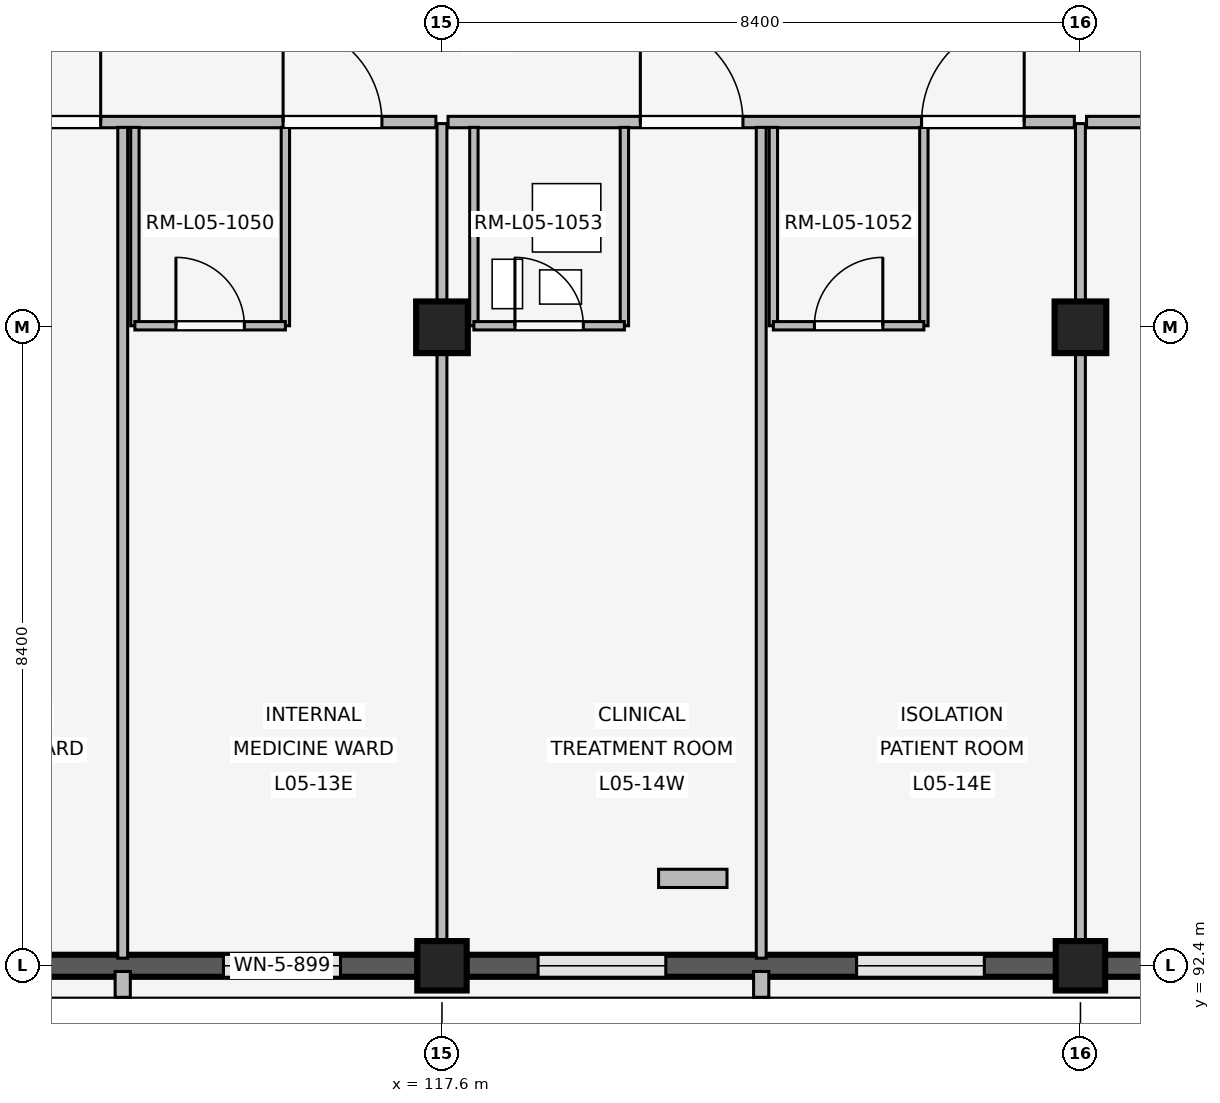
"""IFC4 building model, lengths in metres.
Left out: names, types, materials, properties, quantities, classifications, styles, units other than length and angle.
Written with IfcOpenShell. Run it as: python <this file> out.ifc"""

import sys

from ifc_helpers import new_model, si_unit, direction, frame, frame_2d, origin, origin_2d, place, context, subcontext, project, spatial, rectangle, extrude, element, fill, save


model = new_model("IFC4")
c1 = context("Model", 3, precision=1e-05, world=origin(), true_north=direction((0.0, 1.0)))
c2 = subcontext(c1, "Body", "Model", "MODEL_VIEW")
j1 = project(units=[si_unit("LENGTHUNIT", "METRE"), si_unit("PLANEANGLEUNIT", "RADIAN")], contexts=[c1])
p1 = place(None, origin())
s1 = spatial("IfcSite", under=j1, at=p1, CompositionType="ELEMENT")
p2 = place(p1, origin())
s2 = spatial("IfcBuilding", under=s1, at=p2, CompositionType="ELEMENT")
p3 = place(p2, frame((0.0, 0.0, 20.4)))
s3 = spatial("IfcBuildingStorey", under=s2, at=p3, CompositionType="ELEMENT", Elevation=20.4)
p4 = place(p3, frame((117.6, 92.4, 0.0), z_axis=(0.0, 0.0, 1.0), x_axis=(1.0, 0.0, 0.0)))
e1 = element("IfcColumn", 1, at=p4, inside=s3, PredefinedType="COLUMN", context=c2, shape_type="SweptSolid", body=[
    extrude(rectangle(XDim=0.65, YDim=0.65, at=origin_2d()), origin(), (0.0, 0.0, 1.0), 4.2),
])
p5 = place(p3, frame((117.6, 100.8, 0.0), z_axis=(0.0, 0.0, 1.0), x_axis=(1.0, 0.0, 0.0)))
e2 = element("IfcColumn", 2, at=p5, inside=s3, PredefinedType="COLUMN", context=c2, shape_type="SweptSolid", body=[
    extrude(rectangle(XDim=0.68, YDim=0.68, at=origin_2d()), origin(), (0.0, 0.0, 1.0), 4.2),
])
p6 = place(p3, frame((126.0, 92.4, 0.0), z_axis=(0.0, 0.0, 1.0), x_axis=(1.0, 0.0, 0.0)))
e3 = element("IfcColumn", 3, at=p6, inside=s3, PredefinedType="COLUMN", context=c2, shape_type="SweptSolid", body=[
    extrude(rectangle(XDim=0.65, YDim=0.65, at=origin_2d()), origin(), (0.0, 0.0, 1.0), 4.2),
])
p7 = place(p3, frame((126.0, 100.8, 0.0), z_axis=(0.0, 0.0, 1.0), x_axis=(1.0, 0.0, 0.0)))
e4 = element("IfcColumn", 4, at=p7, inside=s3, PredefinedType="COLUMN", context=c2, shape_type="SweptSolid", body=[
    extrude(rectangle(XDim=0.68, YDim=0.68, at=origin_2d()), origin(), (0.0, 0.0, 1.0), 4.2),
])
p8 = place(p3, frame((117.28, 92.4, 0.0), z_axis=(0.0, 0.0, 1.0), x_axis=(-1.0, 0.0, 0.0)))
e5 = element("IfcWall", 5, at=p8, inside=s3, PredefinedType="SOLIDWALL", context=c2, shape_type="SweptSolid", body=[
    extrude(rectangle(XDim=7.76, YDim=0.29, at=frame_2d((3.88, 0.0))), origin(), (0.0, 0.0, 1.0), 3.34),
])
p9 = place(p8, frame((1.015, 0.0, 0.85)))
e6 = element("IfcOpeningElement", 6, at=p9, cuts=e5, PredefinedType="OPENING", context=c2, shape_type="SweptSolid", body=[
    extrude(rectangle(XDim=1.54, YDim=1.85, at=frame_2d((0.77, 0.925))), frame((0.0, 0.155, 0.0), z_axis=(0.0, -1.0, 0.0), x_axis=(1.0, 0.0, 0.0)), (0.0, 0.0, 1.0), 0.31),
])
p10 = place(p8, frame((5.205, 0.0, 0.85)))
e7 = element("IfcOpeningElement", 7, at=p10, cuts=e5, PredefinedType="OPENING", context=c2, shape_type="SweptSolid", body=[
    extrude(rectangle(XDim=1.54, YDim=1.85, at=frame_2d((0.77, 0.925))), frame((0.0, 0.155, 0.0), z_axis=(0.0, -1.0, 0.0), x_axis=(1.0, 0.0, 0.0)), (0.0, 0.0, 1.0), 0.31),
])
p11 = place(p3, frame((113.4, 92.325, 0.0), z_axis=(0.0, 0.0, 1.0), x_axis=(0.0, -1.0, 0.0)))
e8 = element("IfcWall", 8, at=p11, inside=s3, PredefinedType="ELEMENTEDWALL", context=c2, shape_type="SweptSolid", body=[
    extrude(rectangle(XDim=0.34, YDim=0.2, at=frame_2d((0.17, 0.0))), origin(), (0.0, 0.0, 1.0), 3.32),
])
p12 = place(p3, frame((125.68, 92.4, 0.0), z_axis=(0.0, 0.0, 1.0), x_axis=(-1.0, 0.0, 0.0)))
e9 = element("IfcWall", 9, at=p12, inside=s3, PredefinedType="SOLIDWALL", context=c2, shape_type="SweptSolid", body=[
    extrude(rectangle(XDim=7.76, YDim=0.29, at=frame_2d((3.88, 0.0))), origin(), (0.0, 0.0, 1.0), 3.34),
])
p13 = place(p12, frame((0.945, 0.0, 0.85)))
e10 = element("IfcOpeningElement", 10, at=p13, cuts=e9, PredefinedType="OPENING", context=c2, shape_type="SweptSolid", body=[
    extrude(rectangle(XDim=1.68, YDim=2.05, at=frame_2d((0.84, 1.025))), frame((0.0, 0.155, 0.0), z_axis=(0.0, -1.0, 0.0), x_axis=(1.0, 0.0, 0.0)), (0.0, 0.0, 1.0), 0.31),
])
p14 = place(p12, frame((5.135, 0.0, 0.85)))
e11 = element("IfcOpeningElement", 11, at=p14, cuts=e9, PredefinedType="OPENING", context=c2, shape_type="SweptSolid", body=[
    extrude(rectangle(XDim=1.68, YDim=2.05, at=frame_2d((0.84, 1.025))), frame((0.0, 0.155, 0.0), z_axis=(0.0, -1.0, 0.0), x_axis=(1.0, 0.0, 0.0)), (0.0, 0.0, 1.0), 0.31),
])
p15 = place(p3, frame((121.8, 92.325, 0.0), z_axis=(0.0, 0.0, 1.0), x_axis=(0.0, -1.0, 0.0)))
e12 = element("IfcWall", 12, at=p15, inside=s3, PredefinedType="ELEMENTEDWALL", context=c2, shape_type="SweptSolid", body=[
    extrude(rectangle(XDim=0.34, YDim=0.2, at=frame_2d((0.17, 0.0))), origin(), (0.0, 0.0, 1.0), 3.32),
])
p16 = place(p3, frame((134.08, 92.4, 0.0), z_axis=(0.0, 0.0, 1.0), x_axis=(-1.0, 0.0, 0.0)))
e13 = element("IfcWall", 13, at=p16, inside=s3, PredefinedType="SOLIDWALL", context=c2, shape_type="SweptSolid", body=[
    extrude(rectangle(XDim=7.76, YDim=0.29, at=frame_2d((3.88, 0.0))), origin(), (0.0, 0.0, 1.0), 3.34),
])
p17 = place(p16, frame((1.095, 0.0, 0.85)))
e14 = element("IfcOpeningElement", 14, at=p17, cuts=e13, PredefinedType="OPENING", context=c2, shape_type="SweptSolid", body=[
    extrude(rectangle(XDim=1.38, YDim=1.5, at=frame_2d((0.69, 0.75))), frame((0.0, 0.155, 0.0), z_axis=(0.0, -1.0, 0.0), x_axis=(1.0, 0.0, 0.0)), (0.0, 0.0, 1.0), 0.31),
])
p18 = place(p16, frame((5.285, 0.0, 0.85)))
e15 = element("IfcOpeningElement", 15, at=p18, cuts=e13, PredefinedType="OPENING", context=c2, shape_type="SweptSolid", body=[
    extrude(rectangle(XDim=1.38, YDim=1.5, at=frame_2d((0.69, 0.75))), frame((0.0, 0.155, 0.0), z_axis=(0.0, -1.0, 0.0), x_axis=(1.0, 0.0, 0.0)), (0.0, 0.0, 1.0), 0.31),
])
p19 = place(p3, frame((109.28, 103.5, 0.0), z_axis=(0.0, 0.0, 1.0), x_axis=(1.0, 0.0, 0.0)))
e16 = element("IfcWall", 16, at=p19, inside=s3, PredefinedType="PARTITIONING", context=c2, shape_type="SweptSolid", body=[
    extrude(rectangle(XDim=8.24, YDim=0.15, at=frame_2d((4.12, 0.0))), origin(), (0.0, 0.0, 1.0), 3.32),
])
p20 = place(p19, frame((2.53, 0.0, 0.0)))
e17 = element("IfcOpeningElement", 17, at=p20, cuts=e16, PredefinedType="OPENING", context=c2, shape_type="SweptSolid", body=[
    extrude(rectangle(XDim=1.3, YDim=2.25, at=frame_2d((0.65, 1.125))), frame((0.0, 0.085, 0.0), z_axis=(0.0, -1.0, 0.0), x_axis=(1.0, 0.0, 0.0)), (0.0, 0.0, 1.0), 0.17),
])
p21 = place(p19, frame((6.23, 0.0, 0.0)))
e18 = element("IfcOpeningElement", 18, at=p21, cuts=e16, PredefinedType="OPENING", context=c2, shape_type="SweptSolid", body=[
    extrude(rectangle(XDim=1.3, YDim=2.25, at=frame_2d((0.65, 1.125))), frame((0.0, 0.085, 0.0), z_axis=(0.0, -1.0, 0.0), x_axis=(1.0, 0.0, 0.0)), (0.0, 0.0, 1.0), 0.17),
])
p22 = place(p3, frame((113.4, 92.5, 0.0), z_axis=(0.0, 0.0, 1.0), x_axis=(0.0, 1.0, 0.0)))
e19 = element("IfcWall", 19, at=p22, inside=s3, PredefinedType="PARTITIONING", context=c2, shape_type="SweptSolid", body=[
    extrude(rectangle(XDim=10.93, YDim=0.13, at=frame_2d((5.465, 0.0))), origin(), (0.0, 0.0, 1.0), 3.32),
])
for number, where, z_axis, x_axis in (
    (20, (113.56, 100.82, 0.0), (0.0, 0.0, 1.0), (0.0, 1.0, 0.0)),
    (21, (115.54, 100.82, 0.0), (0.0, 0.0, 1.0), (0.0, 1.0, 0.0)),
):
    element("IfcWall", number, at=place(p3, frame(where, z_axis=z_axis, x_axis=x_axis)), inside=s3, PredefinedType="PARTITIONING", context=c2, shape_type="SweptSolid", body=[
        extrude(rectangle(XDim=2.61, YDim=0.11, at=frame_2d((1.305, 0.0))), origin(), (0.0, 0.0, 1.0), 3.32),
    ])
p23 = place(p3, frame((113.56, 100.82, 0.0), z_axis=(0.0, 0.0, 1.0), x_axis=(1.0, 0.0, 0.0)))
e22 = element("IfcWall", 22, at=p23, inside=s3, PredefinedType="PARTITIONING", context=c2, shape_type="SweptSolid", body=[
    extrude(rectangle(XDim=1.98, YDim=0.11, at=frame_2d((0.99, 0.0))), origin(), (0.0, 0.0, 1.0), 3.32),
])
p24 = place(p23, frame((0.54, 0.0, 0.0)))
e23 = element("IfcOpeningElement", 23, at=p24, cuts=e22, PredefinedType="OPENING", context=c2, shape_type="SweptSolid", body=[
    extrude(rectangle(XDim=0.9, YDim=2.1, at=frame_2d((0.45, 1.05))), frame((0.0, 0.065, 0.0), z_axis=(0.0, -1.0, 0.0), x_axis=(1.0, 0.0, 0.0)), (0.0, 0.0, 1.0), 0.13),
])
p25 = place(p3, frame((117.6, 92.54, 0.0), z_axis=(0.0, 0.0, 1.0), x_axis=(0.0, 1.0, 0.0)))
e24 = element("IfcWall", 24, at=p25, inside=s3, PredefinedType="PARTITIONING", context=c2, shape_type="SweptSolid", body=[
    extrude(rectangle(XDim=10.94, YDim=0.13, at=frame_2d((5.47, 0.0))), origin(), (0.0, 0.0, 1.0), 3.32),
])
p26 = place(p3, frame((117.68, 103.5, 0.0), z_axis=(0.0, 0.0, 1.0), x_axis=(1.0, 0.0, 0.0)))
e25 = element("IfcWall", 25, at=p26, inside=s3, PredefinedType="PARTITIONING", context=c2, shape_type="SweptSolid", body=[
    extrude(rectangle(XDim=8.24, YDim=0.15, at=frame_2d((4.12, 0.0))), origin(), (0.0, 0.0, 1.0), 3.32),
])
p27 = place(p26, frame((2.53, 0.0, 0.0)))
e26 = element("IfcOpeningElement", 26, at=p27, cuts=e25, PredefinedType="OPENING", context=c2, shape_type="SweptSolid", body=[
    extrude(rectangle(XDim=1.35, YDim=2.25, at=frame_2d((0.675, 1.125))), frame((0.0, 0.085, 0.0), z_axis=(0.0, -1.0, 0.0), x_axis=(1.0, 0.0, 0.0)), (0.0, 0.0, 1.0), 0.17),
])
p28 = place(p26, frame((6.23, 0.0, 0.0)))
e27 = element("IfcOpeningElement", 27, at=p28, cuts=e25, PredefinedType="OPENING", context=c2, shape_type="SweptSolid", body=[
    extrude(rectangle(XDim=1.35, YDim=2.25, at=frame_2d((0.675, 1.125))), frame((0.0, 0.085, 0.0), z_axis=(0.0, -1.0, 0.0), x_axis=(1.0, 0.0, 0.0)), (0.0, 0.0, 1.0), 0.17),
])
p29 = place(p3, frame((121.8, 92.5, 0.0), z_axis=(0.0, 0.0, 1.0), x_axis=(0.0, 1.0, 0.0)))
e28 = element("IfcWall", 28, at=p29, inside=s3, PredefinedType="PARTITIONING", context=c2, shape_type="SweptSolid", body=[
    extrude(rectangle(XDim=10.93, YDim=0.13, at=frame_2d((5.465, 0.0))), origin(), (0.0, 0.0, 1.0), 3.32),
])
for number, where, z_axis, x_axis in (
    (29, (118.02, 100.82, 0.0), (0.0, 0.0, 1.0), (0.0, 1.0, 0.0)),
    (30, (120.0, 100.82, 0.0), (0.0, 0.0, 1.0), (0.0, 1.0, 0.0)),
):
    element("IfcWall", number, at=place(p3, frame(where, z_axis=z_axis, x_axis=x_axis)), inside=s3, PredefinedType="PARTITIONING", context=c2, shape_type="SweptSolid", body=[
        extrude(rectangle(XDim=2.61, YDim=0.11, at=frame_2d((1.305, 0.0))), origin(), (0.0, 0.0, 1.0), 3.32),
    ])
p30 = place(p3, frame((118.02, 100.82, 0.0), z_axis=(0.0, 0.0, 1.0), x_axis=(1.0, 0.0, 0.0)))
e31 = element("IfcWall", 31, at=p30, inside=s3, PredefinedType="PARTITIONING", context=c2, shape_type="SweptSolid", body=[
    extrude(rectangle(XDim=1.98, YDim=0.11, at=frame_2d((0.99, 0.0))), origin(), (0.0, 0.0, 1.0), 3.32),
])
p31 = place(p30, frame((0.54, 0.0, 0.0)))
e32 = element("IfcOpeningElement", 32, at=p31, cuts=e31, PredefinedType="OPENING", context=c2, shape_type="SweptSolid", body=[
    extrude(rectangle(XDim=0.9, YDim=2.1, at=frame_2d((0.45, 1.05))), frame((0.0, 0.065, 0.0), z_axis=(0.0, -1.0, 0.0), x_axis=(1.0, 0.0, 0.0)), (0.0, 0.0, 1.0), 0.13),
])
for number, where, z_axis, x_axis in (
    (33, (121.96, 100.82, 0.0), (0.0, 0.0, 1.0), (0.0, 1.0, 0.0)),
    (34, (123.94, 100.82, 0.0), (0.0, 0.0, 1.0), (0.0, 1.0, 0.0)),
):
    element("IfcWall", number, at=place(p3, frame(where, z_axis=z_axis, x_axis=x_axis)), inside=s3, PredefinedType="PARTITIONING", context=c2, shape_type="SweptSolid", body=[
        extrude(rectangle(XDim=2.61, YDim=0.11, at=frame_2d((1.305, 0.0))), origin(), (0.0, 0.0, 1.0), 3.32),
    ])
p32 = place(p3, frame((121.96, 100.82, 0.0), z_axis=(0.0, 0.0, 1.0), x_axis=(1.0, 0.0, 0.0)))
e35 = element("IfcWall", 35, at=p32, inside=s3, PredefinedType="PARTITIONING", context=c2, shape_type="SweptSolid", body=[
    extrude(rectangle(XDim=1.98, YDim=0.11, at=frame_2d((0.99, 0.0))), origin(), (0.0, 0.0, 1.0), 3.32),
])
p33 = place(p32, frame((0.54, 0.0, 0.0)))
e36 = element("IfcOpeningElement", 36, at=p33, cuts=e35, PredefinedType="OPENING", context=c2, shape_type="SweptSolid", body=[
    extrude(rectangle(XDim=0.9, YDim=2.1, at=frame_2d((0.45, 1.05))), frame((0.0, 0.065, 0.0), z_axis=(0.0, -1.0, 0.0), x_axis=(1.0, 0.0, 0.0)), (0.0, 0.0, 1.0), 0.13),
])
p34 = place(p3, frame((120.45, 93.55, 0.0), z_axis=(0.0, 0.0, 1.0), x_axis=(1.0, 0.0, 0.0)))
e37 = element("IfcWall", 37, at=p34, inside=s3, PredefinedType="PLUMBINGWALL", context=c2, shape_type="SweptSolid", body=[
    extrude(rectangle(XDim=0.9, YDim=0.24, at=frame_2d((0.45, 0.0))), origin(), (0.0, 0.0, 1.0), 3.32),
])
p35 = place(p3, frame((126.0, 92.54, 0.0), z_axis=(0.0, 0.0, 1.0), x_axis=(0.0, 1.0, 0.0)))
e38 = element("IfcWall", 38, at=p35, inside=s3, PredefinedType="PARTITIONING", context=c2, shape_type="SweptSolid", body=[
    extrude(rectangle(XDim=10.94, YDim=0.13, at=frame_2d((5.47, 0.0))), origin(), (0.0, 0.0, 1.0), 3.32),
])
p36 = place(p3, frame((126.08, 103.5, 0.0), z_axis=(0.0, 0.0, 1.0), x_axis=(1.0, 0.0, 0.0)))
e39 = element("IfcWall", 39, at=p36, inside=s3, PredefinedType="PARTITIONING", context=c2, shape_type="SweptSolid", body=[
    extrude(rectangle(XDim=8.18, YDim=0.15, at=frame_2d((4.09, 0.0))), origin(), (0.0, 0.0, 1.0), 3.32),
])
p37 = place(p36, frame((1.53, 0.0, 0.0)))
e40 = element("IfcOpeningElement", 40, at=p37, cuts=e39, PredefinedType="OPENING", context=c2, shape_type="SweptSolid", body=[
    extrude(rectangle(XDim=1.85, YDim=2.3, at=frame_2d((0.925, 1.15))), frame((0.0, 0.085, 0.0), z_axis=(0.0, -1.0, 0.0), x_axis=(1.0, 0.0, 0.0)), (0.0, 0.0, 1.0), 0.17),
])
p38 = place(p9, origin())
e41 = element("IfcWindow", 41, at=p38, inside=s3, PartitioningType="SINGLE_PANEL", PredefinedType="WINDOW", context=c2, shape_type="SweptSolid", body=[
    extrude(rectangle(XDim=1.54, YDim=1.85, at=frame_2d((0.77, 0.925))), frame((0.0, 0.03, 0.0), z_axis=(0.0, -1.0, 0.0), x_axis=(1.0, 0.0, 0.0)), (0.0, 0.0, 1.0), 0.06),
])
fill(e6, e41)
p39 = place(p13, origin())
e42 = element("IfcWindow", 42, at=p39, inside=s3, PartitioningType="SINGLE_PANEL", PredefinedType="WINDOW", context=c2, shape_type="SweptSolid", body=[
    extrude(rectangle(XDim=1.68, YDim=2.05, at=frame_2d((0.84, 1.025))), frame((0.0, 0.03, 0.0), z_axis=(0.0, -1.0, 0.0), x_axis=(1.0, 0.0, 0.0)), (0.0, 0.0, 1.0), 0.06),
])
fill(e10, e42)
p40 = place(p14, origin())
e43 = element("IfcWindow", 43, at=p40, inside=s3, PartitioningType="SINGLE_PANEL", PredefinedType="WINDOW", context=c2, shape_type="SweptSolid", body=[
    extrude(rectangle(XDim=1.68, YDim=2.05, at=frame_2d((0.84, 1.025))), frame((0.0, 0.03, 0.0), z_axis=(0.0, -1.0, 0.0), x_axis=(1.0, 0.0, 0.0)), (0.0, 0.0, 1.0), 0.06),
])
fill(e11, e43)
p41 = place(p20, origin())
e44 = element("IfcDoor", 44, at=p41, inside=s3, OperationType="SINGLE_SWING_RIGHT", PredefinedType="DOOR", context=c2, shape_type="SweptSolid", body=[
    extrude(rectangle(XDim=1.3, YDim=2.25, at=frame_2d((0.65, 1.125))), frame((0.0, 0.025, 0.0), z_axis=(0.0, -1.0, 0.0), x_axis=(1.0, 0.0, 0.0)), (0.0, 0.0, 1.0), 0.05),
])
fill(e17, e44)
p42 = place(p21, origin())
e45 = element("IfcDoor", 45, at=p42, inside=s3, OperationType="SINGLE_SWING_LEFT", PredefinedType="DOOR", context=c2, shape_type="SweptSolid", body=[
    extrude(rectangle(XDim=1.3, YDim=2.25, at=frame_2d((0.65, 1.125))), frame((0.0, 0.025, 0.0), z_axis=(0.0, -1.0, 0.0), x_axis=(1.0, 0.0, 0.0)), (0.0, 0.0, 1.0), 0.05),
])
fill(e18, e45)
p43 = place(p24, origin())
e46 = element("IfcDoor", 46, at=p43, inside=s3, OperationType="SINGLE_SWING_LEFT", PredefinedType="DOOR", context=c2, shape_type="SweptSolid", body=[
    extrude(rectangle(XDim=0.9, YDim=2.1, at=frame_2d((0.45, 1.05))), frame((0.0, 0.025, 0.0), z_axis=(0.0, -1.0, 0.0), x_axis=(1.0, 0.0, 0.0)), (0.0, 0.0, 1.0), 0.05),
])
fill(e23, e46)
p44 = place(p27, origin())
e47 = element("IfcDoor", 47, at=p44, inside=s3, OperationType="SINGLE_SWING_LEFT", PredefinedType="DOOR", context=c2, shape_type="SweptSolid", body=[
    extrude(rectangle(XDim=1.35, YDim=2.25, at=frame_2d((0.675, 1.125))), frame((0.0, 0.025, 0.0), z_axis=(0.0, -1.0, 0.0), x_axis=(1.0, 0.0, 0.0)), (0.0, 0.0, 1.0), 0.05),
])
fill(e26, e47)
p45 = place(p28, origin())
e48 = element("IfcDoor", 48, at=p45, inside=s3, OperationType="SINGLE_SWING_RIGHT", PredefinedType="DOOR", context=c2, shape_type="SweptSolid", body=[
    extrude(rectangle(XDim=1.35, YDim=2.25, at=frame_2d((0.675, 1.125))), frame((0.0, 0.025, 0.0), z_axis=(0.0, -1.0, 0.0), x_axis=(1.0, 0.0, 0.0)), (0.0, 0.0, 1.0), 0.05),
])
fill(e27, e48)
p46 = place(p31, origin())
e49 = element("IfcDoor", 49, at=p46, inside=s3, OperationType="SINGLE_SWING_LEFT", PredefinedType="DOOR", context=c2, shape_type="SweptSolid", body=[
    extrude(rectangle(XDim=0.9, YDim=2.1, at=frame_2d((0.45, 1.05))), frame((0.0, 0.025, 0.0), z_axis=(0.0, -1.0, 0.0), x_axis=(1.0, 0.0, 0.0)), (0.0, 0.0, 1.0), 0.05),
])
fill(e32, e49)
p47 = place(p33, origin())
e50 = element("IfcDoor", 50, at=p47, inside=s3, OperationType="SINGLE_SWING_RIGHT", PredefinedType="DOOR", context=c2, shape_type="SweptSolid", body=[
    extrude(rectangle(XDim=0.9, YDim=2.1, at=frame_2d((0.45, 1.05))), frame((0.0, 0.025, 0.0), z_axis=(0.0, -1.0, 0.0), x_axis=(1.0, 0.0, 0.0)), (0.0, 0.0, 1.0), 0.05),
])
fill(e36, e50)
save(model, sys.argv[1])
